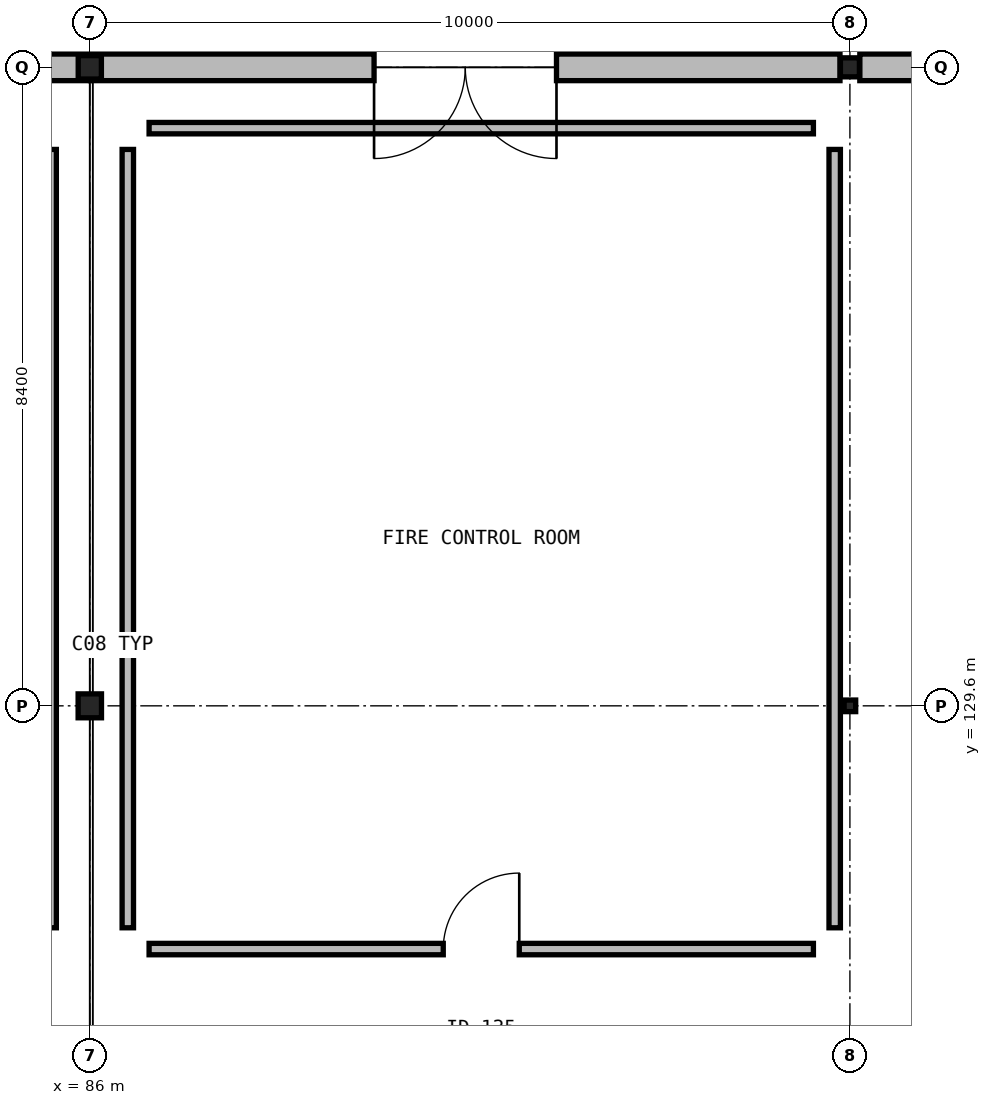
"""IFC4 building model, lengths in metres.
Left out: names, types, materials, properties, quantities, classifications, styles, units other than length and angle.
Written with IfcOpenShell. Run it as: python <this file> out.ifc"""

import sys

from ifc_helpers import new_model, si_unit, direction, frame, frame_2d, origin, origin_2d_with_axis, place, context, subcontext, project, spatial, rectangle, hollow_rectangle, i_section, extrude, element, fill, save


model = new_model("IFC4")
c1 = context("Model", 3, precision=1e-05, world=origin(), true_north=direction((0.0, 1.0)))
c2 = subcontext(c1, "Body", "Model", "MODEL_VIEW")
j1 = project(units=[si_unit("LENGTHUNIT", "METRE"), si_unit("PLANEANGLEUNIT", "RADIAN")], contexts=[c1])
p1 = place(None, origin())
s1 = spatial("IfcSite", under=j1, at=p1, CompositionType="ELEMENT")
p2 = place(p1, origin())
s2 = spatial("IfcBuilding", under=s1, at=p2, CompositionType="ELEMENT")
p3 = place(p2, origin())
s3 = spatial("IfcBuildingStorey", under=s2, at=p3, CompositionType="ELEMENT", Elevation=0.0)
p4 = place(p3, frame((86.0, 129.6, 0.0), z_axis=(0.0, 0.0, 1.0), x_axis=(1.0, 0.0, 0.0)))
e1 = element("IfcColumn", 1, at=p4, inside=s3, PredefinedType="COLUMN", context=c2, shape_type="SweptSolid", body=[
    extrude(i_section(OverallWidth=0.307, OverallDepth=0.315, WebThickness=0.012, FlangeThickness=0.019, FilletRadius=0.017, at=origin_2d_with_axis()), origin(), (0.0, 0.0, 1.0), 4.5),
])
p5 = place(p3, frame((86.0, 138.0, 0.0), z_axis=(0.0, 0.0, 1.0), x_axis=(1.0, 0.0, 0.0)))
e2 = element("IfcColumn", 2, at=p5, inside=s3, PredefinedType="COLUMN", context=c2, shape_type="SweptSolid", body=[
    extrude(i_section(OverallWidth=0.305, OverallDepth=0.308, WebThickness=0.01, FlangeThickness=0.015, FilletRadius=0.017, at=origin_2d_with_axis()), origin(), (0.0, 0.0, 1.0), 4.5),
])
p6 = place(p3, frame((96.0, 129.6, 0.0), z_axis=(0.0, 0.0, 1.0), x_axis=(1.0, 0.0, 0.0)))
e3 = element("IfcColumn", 3, at=p6, inside=s3, PredefinedType="COLUMN", context=c2, shape_type="SweptSolid", body=[
    extrude(i_section(OverallWidth=0.152, OverallDepth=0.152, WebThickness=0.006, FlangeThickness=0.007, FilletRadius=0.009, at=origin_2d_with_axis()), origin(), (0.0, 0.0, 1.0), 4.5),
])
p7 = place(p3, frame((96.0, 138.0, 0.0), z_axis=(0.0, 0.0, 1.0), x_axis=(1.0, 0.0, 0.0)))
e4 = element("IfcColumn", 4, at=p7, inside=s3, PredefinedType="COLUMN", context=c2, shape_type="SweptSolid", body=[
    extrude(hollow_rectangle(XDim=0.25, YDim=0.25, WallThickness=0.009, InnerFilletRadius=0.009, OuterFilletRadius=0.018, at=origin_2d_with_axis()), origin(), (0.0, 0.0, 1.0), 4.5),
])
p8 = place(p3, frame((85.99, 138.0, 0.0), z_axis=(0.0, 0.0, 1.0), x_axis=(-1.0, 0.0, 0.0)))
e5 = element("IfcWall", 5, at=p8, inside=s3, PredefinedType="SOLIDWALL", context=c2, shape_type="SweptSolid", body=[
    extrude(rectangle(XDim=9.736, YDim=0.35, at=frame_2d((4.868, 0.0), x_axis=(1.0, 0.0))), origin(), (0.0, 0.0, 1.0), 3.88),
])
p9 = place(p8, frame((3.668, 0.0, 0.0)))
e6 = element("IfcOpeningElement", 6, at=p9, cuts=e5, PredefinedType="OPENING", context=c2, shape_type="SweptSolid", body=[
    extrude(rectangle(XDim=2.4, YDim=2.8, at=frame_2d((1.2, 1.4), x_axis=(1.0, 0.0))), frame((0.0, 0.185, 0.0), z_axis=(0.0, -1.0, 0.0), x_axis=(1.0, 0.0, 0.0)), (0.0, 0.0, 1.0), 0.37),
])
p10 = place(p3, frame((95.869, 138.0, 0.0), z_axis=(0.0, 0.0, 1.0), x_axis=(-1.0, 0.0, 0.0)))
e7 = element("IfcWall", 7, at=p10, inside=s3, PredefinedType="SOLIDWALL", context=c2, shape_type="SweptSolid", body=[
    extrude(rectangle(XDim=9.859, YDim=0.35, at=frame_2d((4.93, 0.0), x_axis=(1.0, 0.0))), origin(), (0.0, 0.0, 1.0), 3.88),
])
p11 = place(p10, frame((3.73, 0.0, 0.0)))
e8 = element("IfcOpeningElement", 8, at=p11, cuts=e7, PredefinedType="OPENING", context=c2, shape_type="SweptSolid", body=[
    extrude(rectangle(XDim=2.4, YDim=2.8, at=frame_2d((1.2, 1.4), x_axis=(1.0, 0.0))), frame((0.0, 0.185, 0.0), z_axis=(0.0, -1.0, 0.0), x_axis=(1.0, 0.0, 0.0)), (0.0, 0.0, 1.0), 0.37),
])
p12 = place(p3, frame((97.05, 138.0, 0.0), z_axis=(0.0, 0.0, 1.0), x_axis=(-1.0, 0.0, 0.0)))
e9 = element("IfcWall", 9, at=p12, inside=s3, PredefinedType="SOLIDWALL", context=c2, shape_type="SweptSolid", body=[
    extrude(rectangle(XDim=0.919, YDim=0.35, at=frame_2d((0.46, 0.0), x_axis=(1.0, 0.0))), origin(), (0.0, 0.0, 1.0), 3.88),
])
p13 = place(p3, frame((86.78, 126.4, 0.0), z_axis=(0.0, 0.0, 1.0), x_axis=(1.0, 0.0, 0.0)))
e10 = element("IfcWall", 10, at=p13, inside=s3, PredefinedType="PARTITIONING", context=c2, shape_type="SweptSolid", body=[
    extrude(rectangle(XDim=8.74, YDim=0.15, at=frame_2d((4.37, 0.0), x_axis=(1.0, 0.0))), origin(), (0.0, 0.0, 1.0), 3.62),
])
p14 = place(p13, frame((3.87, 0.0, 0.0)))
e11 = element("IfcOpeningElement", 11, at=p14, cuts=e10, PredefinedType="OPENING", context=c2, shape_type="SweptSolid", body=[
    extrude(rectangle(XDim=1.0, YDim=2.15, at=frame_2d((0.5, 1.075), x_axis=(1.0, 0.0))), frame((0.0, 0.085, 0.0), z_axis=(0.0, -1.0, 0.0), x_axis=(1.0, 0.0, 0.0)), (0.0, 0.0, 1.0), 0.17),
])
p15 = place(p3, frame((95.8, 126.68, 0.0), z_axis=(0.0, 0.0, 1.0), x_axis=(0.0, 1.0, 0.0)))
e12 = element("IfcWall", 12, at=p15, inside=s3, PredefinedType="PARTITIONING", context=c2, shape_type="SweptSolid", body=[
    extrude(rectangle(XDim=10.24, YDim=0.15, at=frame_2d((5.12, 0.0), x_axis=(1.0, 0.0))), origin(), (0.0, 0.0, 1.0), 3.62),
])
p16 = place(p3, frame((95.52, 137.2, 0.0), z_axis=(0.0, 0.0, 1.0), x_axis=(-1.0, 0.0, 0.0)))
e13 = element("IfcWall", 13, at=p16, inside=s3, PredefinedType="PARTITIONING", context=c2, shape_type="SweptSolid", body=[
    extrude(rectangle(XDim=8.74, YDim=0.15, at=frame_2d((4.37, 0.0), x_axis=(1.0, 0.0))), origin(), (0.0, 0.0, 1.0), 3.62),
])
p17 = place(p3, frame((86.5, 136.92, 0.0), z_axis=(0.0, 0.0, 1.0), x_axis=(0.0, -1.0, 0.0)))
e14 = element("IfcWall", 14, at=p17, inside=s3, PredefinedType="PARTITIONING", context=c2, shape_type="SweptSolid", body=[
    extrude(rectangle(XDim=10.24, YDim=0.15, at=frame_2d((5.12, 0.0), x_axis=(1.0, 0.0))), origin(), (0.0, 0.0, 1.0), 3.62),
])
p18 = place(p3, frame((85.5, 126.68, 0.0), z_axis=(0.0, 0.0, 1.0), x_axis=(0.0, 1.0, 0.0)))
e15 = element("IfcWall", 15, at=p18, inside=s3, PredefinedType="PARTITIONING", context=c2, shape_type="SweptSolid", body=[
    extrude(rectangle(XDim=10.24, YDim=0.12, at=frame_2d((5.12, 0.0), x_axis=(1.0, 0.0))), origin(), (0.0, 0.0, 1.0), 3.62),
])
p19 = place(p11, origin())
e16 = element("IfcDoor", 16, at=p19, inside=s3, OperationType="DOUBLE_SWING_LEFT", PredefinedType="DOOR", context=c2, shape_type="SweptSolid", body=[
    extrude(rectangle(XDim=2.4, YDim=2.8, at=frame_2d((1.2, 1.4), x_axis=(1.0, 0.0))), frame((0.0, 0.025, 0.0), z_axis=(0.0, -1.0, 0.0), x_axis=(1.0, 0.0, 0.0)), (0.0, 0.0, 1.0), 0.05),
])
fill(e8, e16)
p20 = place(p14, origin())
e17 = element("IfcDoor", 17, at=p20, inside=s3, OperationType="SINGLE_SWING_RIGHT", PredefinedType="DOOR", context=c2, shape_type="SweptSolid", body=[
    extrude(rectangle(XDim=1.0, YDim=2.15, at=frame_2d((0.5, 1.075), x_axis=(1.0, 0.0))), frame((0.0, 0.025, 0.0), z_axis=(0.0, -1.0, 0.0), x_axis=(1.0, 0.0, 0.0)), (0.0, 0.0, 1.0), 0.05),
])
fill(e11, e17)
save(model, sys.argv[1])
